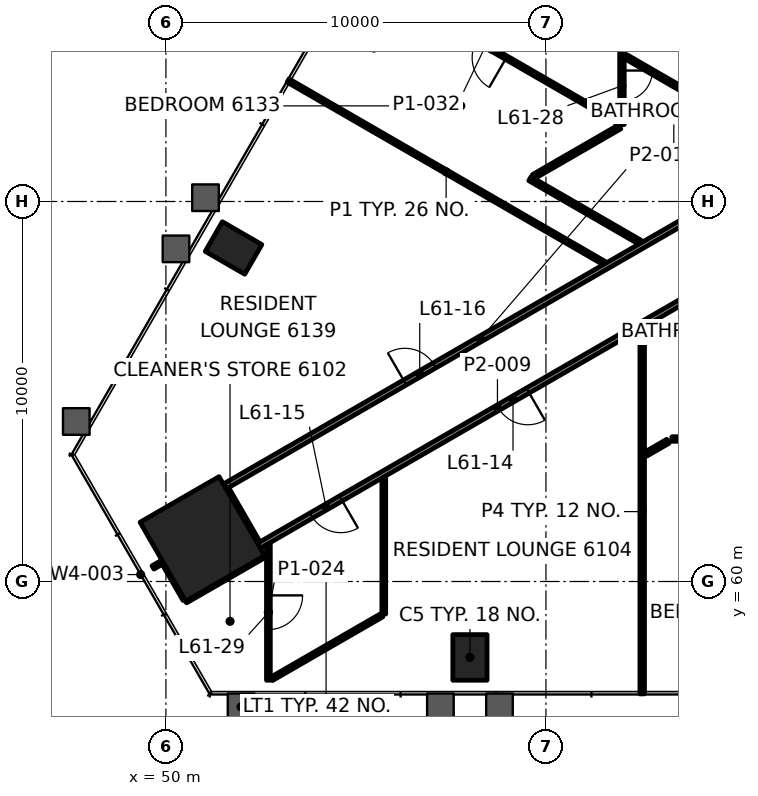
"""IFC4 building model, lengths in metres.
Left out: names, types, materials, properties, quantities, classifications, styles, units other than length and angle.
Written with IfcOpenShell. Run it as: python <this file> out.ifc"""

import sys

from ifc_helpers import new_model, si_unit, direction, frame, frame_2d, origin, origin_2d, place, context, subcontext, project, spatial, rectangle, hollow_rectangle, extrude, element, fill, save


model = new_model("IFC4")
c1 = context("Model", 3, precision=1e-05, world=origin(), true_north=direction((0.0, 1.0)))
c2 = subcontext(c1, "Body", "Model", "MODEL_VIEW")
j1 = project(units=[si_unit("LENGTHUNIT", "METRE"), si_unit("PLANEANGLEUNIT", "RADIAN")], contexts=[c1])
p1 = place(None, origin())
s1 = spatial("IfcSite", under=j1, at=p1, CompositionType="ELEMENT")
p2 = place(p1, origin())
s2 = spatial("IfcBuilding", under=s1, at=p2, CompositionType="ELEMENT")
p3 = place(p2, frame((0.0, 0.0, 260.1)))
s3 = spatial("IfcBuildingStorey", under=s2, at=p3, CompositionType="ELEMENT", Elevation=260.1)
p4 = place(p3, frame((50.959, 61.12, 0.0), z_axis=(0.0, 0.0, 1.0), x_axis=(0.5, -0.866025403784, 0.0)))
e1 = element("IfcColumn", 1, at=p4, inside=s3, PredefinedType="COLUMN", context=c2, shape_type="SweptSolid", body=[
    extrude(rectangle(XDim=2.4, YDim=2.4, at=origin_2d()), origin(), (0.0, 0.0, 1.0), 3.5),
])
for number, where, z_axis, x_axis in (
    (2, (58.0, 58.002, -0.0), (0.0, 0.0, 1.0), (1.0, 0.0, 0.0)),
    (3, (51.78, 68.777, -0.0), (0.0, 0.0, 1.0), (-0.5, -0.866, 0.0)),
):
    element("IfcColumn", number, at=place(p3, frame(where, z_axis=z_axis, x_axis=x_axis)), inside=s3, PredefinedType="COLUMN", context=c2, shape_type="SweptSolid", body=[
        extrude(hollow_rectangle(XDim=0.9, YDim=1.2, WallThickness=0.06, at=origin_2d()), origin(), (0.0, 0.0, 1.0), 3.5),
    ])
p5 = place(p3, frame((63.314, 63.75, 0.0), z_axis=(0.0, 0.0, 1.0), x_axis=(1.0, 0.0, 0.0)))
e4 = element("IfcWall", 4, at=p5, inside=s3, PredefinedType="PARTITIONING", context=c2, shape_type="SweptSolid", body=[
    extrude(rectangle(XDim=23.371, YDim=0.12, at=frame_2d((11.686, 0.0))), origin(), (0.0, 0.0, 1.0), 2.7),
])
p6 = place(p5, frame((1.372, 0.0, 0.0)))
e5 = element("IfcOpeningElement", 5, at=p6, cuts=e4, PredefinedType="OPENING", context=c2, shape_type="SweptSolid", body=[
    extrude(rectangle(XDim=0.8, YDim=2.1, at=frame_2d((0.4, 1.05))), frame((0.0, 0.07, 0.0), z_axis=(0.0, -1.0, 0.0), x_axis=(1.0, 0.0, 0.0)), (0.0, 0.0, 1.0), 0.14),
])
p7 = place(p5, frame((6.249, 0.0, 0.0)))
e6 = element("IfcOpeningElement", 6, at=p7, cuts=e4, PredefinedType="OPENING", context=c2, shape_type="SweptSolid", body=[
    extrude(rectangle(XDim=0.9, YDim=2.1, at=frame_2d((0.45, 1.05))), frame((0.0, 0.07, 0.0), z_axis=(0.0, -1.0, 0.0), x_axis=(1.0, 0.0, 0.0)), (0.0, 0.0, 1.0), 0.14),
])
p8 = place(p5, frame((12.595, 0.0, 0.0)))
e7 = element("IfcOpeningElement", 7, at=p8, cuts=e4, PredefinedType="OPENING", context=c2, shape_type="SweptSolid", body=[
    extrude(rectangle(XDim=0.9, YDim=2.1, at=frame_2d((0.45, 1.05))), frame((0.0, 0.07, 0.0), z_axis=(0.0, -1.0, 0.0), x_axis=(1.0, 0.0, 0.0)), (0.0, 0.0, 1.0), 0.14),
])
p9 = place(p5, frame((18.992, 0.0, 0.0)))
e8 = element("IfcOpeningElement", 8, at=p9, cuts=e4, PredefinedType="OPENING", context=c2, shape_type="SweptSolid", body=[
    extrude(rectangle(XDim=0.8, YDim=2.1, at=frame_2d((0.4, 1.05))), frame((0.0, 0.07, 0.0), z_axis=(0.0, -1.0, 0.0), x_axis=(1.0, 0.0, 0.0)), (0.0, 0.0, 1.0), 0.14),
])
p10 = place(p5, frame((22.078, 0.0, 0.0)))
e9 = element("IfcOpeningElement", 9, at=p10, cuts=e4, PredefinedType="OPENING", context=c2, shape_type="SweptSolid", body=[
    extrude(rectangle(XDim=0.9, YDim=2.1, at=frame_2d((0.45, 1.05))), frame((0.0, 0.07, 0.0), z_axis=(0.0, -1.0, 0.0), x_axis=(1.0, 0.0, 0.0)), (0.0, 0.0, 1.0), 0.14),
])
p11 = place(p3, frame((52.779, 57.437, 0.0), z_axis=(0.0, 0.0, 1.0), x_axis=(0.866038859646, 0.49997669304, 0.0)))
e10 = element("IfcWall", 10, at=p11, inside=s3, PredefinedType="PARTITIONING", context=c2, shape_type="SweptSolid", body=[
    extrude(rectangle(XDim=3.353, YDim=0.1, at=frame_2d((1.676, 0.0))), origin(), (0.0, 0.0, 1.0), 2.7),
])
p12 = place(p3, frame((62.628, 63.354, 0.0), z_axis=(0.0, 0.0, 1.0), x_axis=(0.865955892764, 0.500120377296, 0.0)))
e11 = element("IfcWall", 11, at=p12, inside=s3, PredefinedType="PARTITIONING", context=c2, shape_type="SweptSolid", body=[
    extrude(rectangle(XDim=0.673, YDim=0.12, at=frame_2d((0.336, 0.0))), origin(), (0.0, 0.0, 1.0), 2.7),
])
p13 = place(p3, frame((50.52, 59.481, 0.0), z_axis=(0.0, 0.0, 1.0), x_axis=(0.866036455013, 0.499980858223, 0.0)))
e12 = element("IfcWall", 12, at=p13, inside=s3, PredefinedType="PARTITIONING", context=c2, shape_type="SweptSolid", body=[
    extrude(rectangle(XDim=2.399, YDim=0.1, at=frame_2d((1.199, 0.0))), origin(), (0.0, 0.0, 1.0), 2.7),
])
p14 = place(p3, frame((65.0, 68.187, 0.0), z_axis=(0.0, 0.0, 1.0), x_axis=(-0.866027660432, -0.499996091351, 0.0)))
e13 = element("IfcWall", 13, at=p14, inside=s3, PredefinedType="PARTITIONING", context=c2, shape_type="SweptSolid", body=[
    extrude(rectangle(XDim=14.494, YDim=0.15, at=frame_2d((7.247, 0.0))), origin(), (0.0, 0.0, 1.0), 2.547),
])
p15 = place(p14, frame((6.324, 0.0, 0.0)))
e14 = element("IfcOpeningElement", 14, at=p15, cuts=e13, PredefinedType="OPENING", context=c2, shape_type="SweptSolid", body=[
    extrude(rectangle(XDim=0.9, YDim=2.1, at=frame_2d((0.45, 1.05))), frame((0.0, 0.085, 0.0), z_axis=(0.0, -1.0, 0.0), x_axis=(1.0, 0.0, 0.0)), (0.0, 0.0, 1.0), 0.17),
])
p16 = place(p14, frame((12.004, 0.0, 0.0)))
e15 = element("IfcOpeningElement", 15, at=p16, cuts=e13, PredefinedType="OPENING", context=c2, shape_type="SweptSolid", body=[
    extrude(rectangle(XDim=0.9, YDim=2.1, at=frame_2d((0.45, 1.05))), frame((0.0, 0.085, 0.0), z_axis=(0.0, -1.0, 0.0), x_axis=(1.0, 0.0, 0.0)), (0.0, 0.0, 1.0), 0.17),
])
p17 = place(p3, frame((49.66, 60.37, 0.0), z_axis=(0.0, 0.0, 1.0), x_axis=(0.866006330792, 0.500033033937, 0.0)))
e16 = element("IfcWall", 16, at=p17, inside=s3, PredefinedType="PARTITIONING", context=c2, shape_type="SweptSolid", body=[
    extrude(rectangle(XDim=0.25, YDim=0.1, at=frame_2d((0.125, 0.0))), origin(), (0.0, 0.0, 1.0), 2.7),
])
p18 = place(p3, frame((51.549, 62.5, 0.0), z_axis=(0.0, 0.0, 1.0), x_axis=(0.866020420161, 0.50000863179, 0.0)))
e17 = element("IfcWall", 17, at=p18, inside=s3, PredefinedType="PARTITIONING", context=c2, shape_type="SweptSolid", body=[
    extrude(rectangle(XDim=15.532, YDim=0.15, at=frame_2d((7.766, 0.0))), origin(), (0.0, 0.0, 1.0), 2.7),
])
p19 = place(p18, frame((5.474, 0.0, 0.0)))
e18 = element("IfcOpeningElement", 18, at=p19, cuts=e17, PredefinedType="OPENING", context=c2, shape_type="SweptSolid", body=[
    extrude(rectangle(XDim=0.9, YDim=2.1, at=frame_2d((0.45, 1.05))), frame((0.0, 0.085, 0.0), z_axis=(0.0, -1.0, 0.0), x_axis=(1.0, 0.0, 0.0)), (0.0, 0.0, 1.0), 0.17),
])
p20 = place(p3, frame((59.673, 70.655, 0.0), z_axis=(0.0, 0.0, 1.0), x_axis=(0.866053563643, 0.499951222523, 0.0)))
e19 = element("IfcWall", 19, at=p20, inside=s3, PredefinedType="PARTITIONING", context=c2, shape_type="SweptSolid", body=[
    extrude(rectangle(XDim=2.617, YDim=0.12, at=frame_2d((1.309, 0.0))), origin(), (0.0, 0.0, 1.0), 2.7),
])
p21 = place(p3, frame((62.533, 57.042, 0.0), z_axis=(0.0, 0.0, 1.0), x_axis=(0.0, 1.0, 0.0)))
e20 = element("IfcWall", 20, at=p21, inside=s3, PredefinedType="PARTITIONING", context=c2, shape_type="SweptSolid", body=[
    extrude(rectangle(XDim=9.594, YDim=0.12, at=frame_2d((4.797, 0.0))), origin(), (0.0, 0.0, 1.0), 2.547),
])
p22 = place(p3, frame((62.0, 85.912, 0.0), z_axis=(0.0, 0.0, 1.0), x_axis=(0.0, -1.0, 0.0)))
e21 = element("IfcWall", 21, at=p22, inside=s3, PredefinedType="PARTITIONING", context=c2, shape_type="SweptSolid", body=[
    extrude(rectangle(XDim=13.888, YDim=0.12, at=frame_2d((6.944, 0.0))), origin(), (0.0, 0.0, 1.0), 2.7),
])
p23 = place(p22, frame((1.224, 0.0, 0.0)))
e22 = element("IfcOpeningElement", 22, at=p23, cuts=e21, PredefinedType="OPENING", context=c2, shape_type="SweptSolid", body=[
    extrude(rectangle(XDim=0.9, YDim=2.1, at=frame_2d((0.45, 1.05))), frame((0.0, 0.07, 0.0), z_axis=(0.0, -1.0, 0.0), x_axis=(1.0, 0.0, 0.0)), (0.0, 0.0, 1.0), 0.14),
])
p24 = place(p22, frame((9.49, 0.0, 0.0)))
e23 = element("IfcOpeningElement", 23, at=p24, cuts=e21, PredefinedType="OPENING", context=c2, shape_type="SweptSolid", body=[
    extrude(rectangle(XDim=0.9, YDim=2.1, at=frame_2d((0.45, 1.05))), frame((0.0, 0.07, 0.0), z_axis=(0.0, -1.0, 0.0), x_axis=(1.0, 0.0, 0.0)), (0.0, 0.0, 1.0), 0.14),
])
p25 = place(p22, frame((12.466, 0.0, 0.0)))
e24 = element("IfcOpeningElement", 24, at=p25, cuts=e21, PredefinedType="OPENING", context=c2, shape_type="SweptSolid", body=[
    extrude(rectangle(XDim=0.8, YDim=2.1, at=frame_2d((0.4, 1.05))), frame((0.0, 0.07, 0.0), z_axis=(0.0, -1.0, 0.0), x_axis=(1.0, 0.0, 0.0)), (0.0, 0.0, 1.0), 0.14),
])
p26 = place(p3, frame((55.733, 59.142, 0.0), z_axis=(0.0, 0.0, 1.0), x_axis=(0.0, 1.0, 0.0)))
e25 = element("IfcWall", 25, at=p26, inside=s3, PredefinedType="PARTITIONING", context=c2, shape_type="SweptSolid", body=[
    extrude(rectangle(XDim=3.578, YDim=0.1, at=frame_2d((1.789, 0.0))), origin(), (0.0, 0.0, 1.0), 2.7),
])
p27 = place(p3, frame((52.697, 60.967, 0.0), z_axis=(0.0, 0.0, 1.0), x_axis=(0.0, -1.0, 0.0)))
e26 = element("IfcWall", 26, at=p27, inside=s3, PredefinedType="PARTITIONING", context=c2, shape_type="SweptSolid", body=[
    extrude(rectangle(XDim=3.565, YDim=0.1, at=frame_2d((1.783, 0.0))), origin(), (0.0, 0.0, 1.0), 2.7),
])
p28 = place(p27, frame((1.333, 0.0, 0.0)))
e27 = element("IfcOpeningElement", 27, at=p28, cuts=e26, PredefinedType="OPENING", context=c2, shape_type="SweptSolid", body=[
    extrude(rectangle(XDim=0.9, YDim=2.1, at=frame_2d((0.45, 1.05))), frame((0.0, 0.06, 0.0), z_axis=(0.0, -1.0, 0.0), x_axis=(1.0, 0.0, 0.0)), (0.0, 0.0, 1.0), 0.12),
])
p29 = place(p3, frame((52.408, 61.01, 0.0), z_axis=(0.0, 0.0, 1.0), x_axis=(-0.499988108725, 0.866032269107, 0.0)))
e28 = element("IfcWall", 28, at=p29, inside=s3, PredefinedType="PARTITIONING", context=c2, shape_type="SweptSolid", body=[
    extrude(rectangle(XDim=1.644, YDim=0.15, at=frame_2d((0.822, 0.0))), origin(), (0.0, 0.0, 1.0), 2.547),
])
p30 = place(p3, frame((50.495, 59.525, 0.0), z_axis=(0.0, 0.0, 1.0), x_axis=(-0.50004744102, 0.865998011966, 0.0)))
e29 = element("IfcWall", 29, at=p30, inside=s3, PredefinedType="PARTITIONING", context=c2, shape_type="SweptSolid", body=[
    extrude(rectangle(XDim=1.149, YDim=0.1, at=frame_2d((0.574, 0.0))), origin(), (0.0, 0.0, 1.0), 2.7),
])
p31 = place(p3, frame((64.89, 72.2, 0.0), z_axis=(0.0, 0.0, 1.0), x_axis=(-0.866033195618, 0.499986503906, 0.0)))
e30 = element("IfcWall", 30, at=p31, inside=s3, PredefinedType="PARTITIONING", context=c2, shape_type="SweptSolid", body=[
    extrude(rectangle(XDim=3.228, YDim=0.12, at=frame_2d((1.614, 0.0))), origin(), (0.0, 0.0, 1.0), 2.7),
])
p32 = place(p3, frame((61.914, 72.076, 0.0), z_axis=(0.0, 0.0, 1.0), x_axis=(-0.86602370202, 0.50000294753, 0.0)))
e31 = element("IfcWall", 31, at=p32, inside=s3, PredefinedType="PARTITIONING", context=c2, shape_type="SweptSolid", body=[
    extrude(rectangle(XDim=8.087, YDim=0.1, at=frame_2d((4.043, 0.0))), origin(), (0.0, 0.0, 1.0), 2.688),
])
p33 = place(p32, frame((3.413, 0.0, 0.0)))
e32 = element("IfcOpeningElement", 32, at=p33, cuts=e31, PredefinedType="OPENING", context=c2, shape_type="SweptSolid", body=[
    extrude(rectangle(XDim=0.9, YDim=2.1, at=frame_2d((0.45, 1.05))), frame((0.0, 0.06, 0.0), z_axis=(0.0, -1.0, 0.0), x_axis=(1.0, 0.0, 0.0)), (0.0, 0.0, 1.0), 0.12),
])
p34 = place(p3, frame((62.469, 68.931, 0.0), z_axis=(0.0, 0.0, 1.0), x_axis=(-0.866033317326, 0.499986293093, 0.0)))
e33 = element("IfcWall", 33, at=p34, inside=s3, PredefinedType="PARTITIONING", context=c2, shape_type="SweptSolid", body=[
    extrude(rectangle(XDim=3.337, YDim=0.12, at=frame_2d((1.669, 0.0))), origin(), (0.0, 0.0, 1.0), 2.7),
])
p35 = place(p3, frame((61.532, 68.38, 0.0), z_axis=(0.0, 0.0, 1.0), x_axis=(-0.866022611517, 0.500004836318, 0.0)))
e34 = element("IfcWall", 34, at=p35, inside=s3, PredefinedType="PARTITIONING", context=c2, shape_type="SweptSolid", body=[
    extrude(rectangle(XDim=9.604, YDim=0.1, at=frame_2d((4.802, 0.0))), origin(), (0.0, 0.0, 1.0), 2.7),
])
p36 = place(p15, origin())
e35 = element("IfcDoor", 35, at=p36, inside=s3, OperationType="SINGLE_SWING_RIGHT", PredefinedType="DOOR", context=c2, shape_type="SweptSolid", body=[
    extrude(rectangle(XDim=0.9, YDim=2.1, at=frame_2d((0.45, 1.05))), frame((0.0, 0.025, 0.0), z_axis=(0.0, -1.0, 0.0), x_axis=(1.0, 0.0, 0.0)), (0.0, 0.0, 1.0), 0.05),
])
fill(e14, e35)
p37 = place(p16, origin())
e36 = element("IfcDoor", 36, at=p37, inside=s3, OperationType="SINGLE_SWING_LEFT", PredefinedType="DOOR", context=c2, shape_type="SweptSolid", body=[
    extrude(rectangle(XDim=0.9, YDim=2.1, at=frame_2d((0.45, 1.05))), frame((0.0, 0.025, 0.0), z_axis=(0.0, -1.0, 0.0), x_axis=(1.0, 0.0, 0.0)), (0.0, 0.0, 1.0), 0.05),
])
fill(e15, e36)
p38 = place(p19, origin())
e37 = element("IfcDoor", 37, at=p38, inside=s3, OperationType="SINGLE_SWING_RIGHT", PredefinedType="DOOR", context=c2, shape_type="SweptSolid", body=[
    extrude(rectangle(XDim=0.9, YDim=2.1, at=frame_2d((0.45, 1.05))), frame((0.0, 0.025, 0.0), z_axis=(0.0, -1.0, 0.0), x_axis=(1.0, 0.0, 0.0)), (0.0, 0.0, 1.0), 0.05),
])
fill(e18, e37)
p39 = place(p25, origin())
e38 = element("IfcDoor", 38, at=p39, inside=s3, OperationType="SINGLE_SWING_RIGHT", PredefinedType="DOOR", context=c2, shape_type="SweptSolid", body=[
    extrude(rectangle(XDim=0.8, YDim=2.1, at=frame_2d((0.4, 1.05))), frame((0.0, 0.025, 0.0), z_axis=(0.0, -1.0, 0.0), x_axis=(1.0, 0.0, 0.0)), (0.0, 0.0, 1.0), 0.05),
])
fill(e24, e38)
p40 = place(p28, origin())
e39 = element("IfcDoor", 39, at=p40, inside=s3, OperationType="SINGLE_SWING_RIGHT", PredefinedType="DOOR", context=c2, shape_type="SweptSolid", body=[
    extrude(rectangle(XDim=0.9, YDim=2.1, at=frame_2d((0.45, 1.05))), frame((0.0, 0.025, 0.0), z_axis=(0.0, -1.0, 0.0), x_axis=(1.0, 0.0, 0.0)), (0.0, 0.0, 1.0), 0.05),
])
fill(e27, e39)
p41 = place(p33, origin())
e40 = element("IfcDoor", 40, at=p41, inside=s3, OperationType="SINGLE_SWING_RIGHT", PredefinedType="DOOR", context=c2, shape_type="SweptSolid", body=[
    extrude(rectangle(XDim=0.9, YDim=2.1, at=frame_2d((0.45, 1.05))), frame((0.0, 0.025, 0.0), z_axis=(0.0, -1.0, 0.0), x_axis=(1.0, 0.0, 0.0)), (0.0, 0.0, 1.0), 0.05),
])
fill(e32, e40)
save(model, sys.argv[1])
